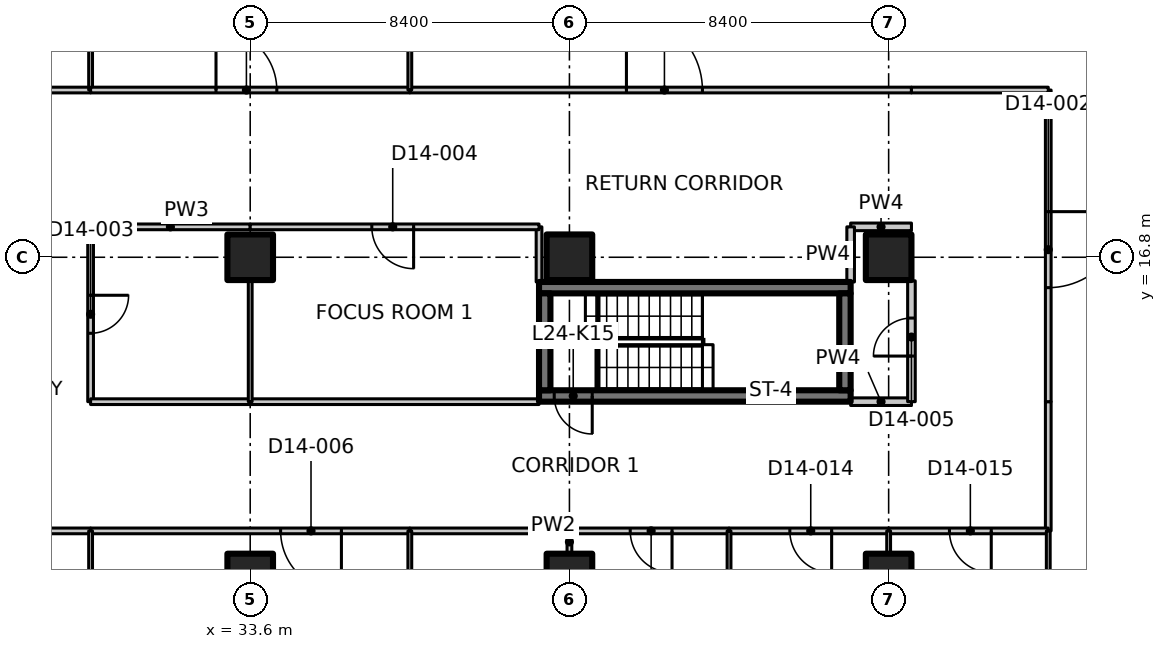
"""IFC4 building model, lengths in metres.
Left out: names, types, materials, properties, quantities, classifications, styles, units other than length and angle.
Written with IfcOpenShell. Run it as: python <this file> out.ifc"""

import sys

from ifc_helpers import new_model, si_unit, direction, frame, frame_2d, origin, origin_2d, place, context, subcontext, project, spatial, polyline, rectangle, outline, extrude, element, fill, save


model = new_model("IFC4")
c1 = context("Model", 3, precision=1e-05, world=origin(), true_north=direction((0.0, 1.0)))
c2 = subcontext(c1, "Body", "Model", "MODEL_VIEW")
j1 = project(units=[si_unit("LENGTHUNIT", "METRE"), si_unit("PLANEANGLEUNIT", "RADIAN")], contexts=[c1])
p1 = place(None, origin())
s1 = spatial("IfcSite", under=j1, at=p1, CompositionType="ELEMENT")
p2 = place(p1, origin())
s2 = spatial("IfcBuilding", under=s1, at=p2, CompositionType="ELEMENT")
p3 = place(p2, frame((0.0, 0.0, 102.5)))
s3 = spatial("IfcBuildingStorey", under=s2, at=p3, CompositionType="ELEMENT", Elevation=102.5)
for number, where, z_axis, x_axis in (
    (1, (33.6, 8.4, 0.0), (0.0, 0.0, 1.0), (1.0, 0.0, 0.0)),
    (2, (33.6, 16.8, 0.0), (0.0, 0.0, 1.0), (1.0, 0.0, 0.0)),
    (3, (42.0, 8.4, 0.0), (0.0, 0.0, 1.0), (1.0, 0.0, 0.0)),
    (4, (42.0, 16.8, 0.0), (0.0, 0.0, 1.0), (1.0, 0.0, 0.0)),
    (5, (50.4, 8.4, 0.0), (0.0, 0.0, 1.0), (1.0, 0.0, 0.0)),
    (6, (50.4, 16.8, 0.0), (0.0, 0.0, 1.0), (1.0, 0.0, 0.0)),
):
    element("IfcColumn", number, at=place(p3, frame(where, z_axis=z_axis, x_axis=x_axis)), inside=s3, PredefinedType="COLUMN", context=c2, shape_type="SweptSolid", body=[
        extrude(rectangle(XDim=1.2, YDim=1.2, at=origin_2d()), origin(), (0.0, 0.0, 1.0), 3.35),
    ])
p4 = place(p3, frame((49.4, 13.15, 0.0), z_axis=(0.0, 0.0, 1.0), x_axis=(-1.0, 0.0, 0.0)))
e7 = element("IfcWall", 7, at=p4, inside=s3, PredefinedType="SHEAR", context=c2, shape_type="SweptSolid", body=[
    extrude(rectangle(XDim=8.2, YDim=0.3, at=frame_2d((4.1, 0.0))), origin(), (0.0, 0.0, 1.0), 3.35),
])
p5 = place(p4, frame((6.8, 0.0, 0.0)))
e8 = element("IfcOpeningElement", 8, at=p5, cuts=e7, PredefinedType="OPENING", context=c2, shape_type="SweptSolid", body=[
    extrude(rectangle(XDim=1.0, YDim=2.1, at=frame_2d((0.5, 1.05))), frame((0.0, 0.16, 0.0), z_axis=(0.0, -1.0, 0.0), x_axis=(1.0, 0.0, 0.0)), (0.0, 0.0, 1.0), 0.32),
])
p6 = place(p3, frame((41.2, 16.0, 0.0), z_axis=(0.0, 0.0, 1.0), x_axis=(1.0, 0.0, 0.0)))
e9 = element("IfcWall", 9, at=p6, inside=s3, PredefinedType="SHEAR", context=c2, shape_type="SweptSolid", body=[
    extrude(rectangle(XDim=8.2, YDim=0.3, at=frame_2d((4.1, 0.0))), origin(), (0.0, 0.0, 1.0), 3.35),
])
for number, where, z_axis, x_axis in (
    (10, (41.35, 13.3, 0.0), (0.0, 0.0, 1.0), (0.0, 1.0, 0.0)),
    (11, (49.25, 13.3, 0.0), (0.0, 0.0, 1.0), (0.0, 1.0, 0.0)),
):
    element("IfcWall", number, at=place(p3, frame(where, z_axis=z_axis, x_axis=x_axis)), inside=s3, PredefinedType="SHEAR", context=c2, shape_type="SweptSolid", body=[
        extrude(rectangle(XDim=2.55, YDim=0.3, at=frame_2d((1.275, 0.0))), origin(), (0.0, 0.0, 1.0), 3.35),
    ])
p7 = place(p3, frame((25.2, 21.2, 0.0), z_axis=(0.0, 0.0, 1.0), x_axis=(1.0, 0.0, 0.0)))
e12 = element("IfcWall", 12, at=p7, inside=s3, PredefinedType="PARTITIONING", context=c2, shape_type="SweptSolid", body=[
    extrude(rectangle(XDim=4.2, YDim=0.15, at=frame_2d((2.1, 0.0))), origin(), (0.0, 0.0, 1.0), 3.33),
])
p8 = place(p3, frame((29.4, 17.6, 0.0), z_axis=(0.0, 0.0, 1.0), x_axis=(0.0, -1.0, 0.0)))
e13 = element("IfcWall", 13, at=p8, inside=s3, PredefinedType="PARTITIONING", context=c2, shape_type="SweptSolid", body=[
    extrude(rectangle(XDim=4.6, YDim=0.15, at=frame_2d((2.3, 0.0))), origin(), (0.0, 0.0, 1.0), 3.33),
])
p9 = place(p8, frame((1.8, 0.0, 0.0)))
e14 = element("IfcOpeningElement", 14, at=p9, cuts=e13, PredefinedType="OPENING", context=c2, shape_type="SweptSolid", body=[
    extrude(rectangle(XDim=1.0, YDim=2.1, at=frame_2d((0.5, 1.05))), frame((0.0, 0.085, 0.0), z_axis=(0.0, -1.0, 0.0), x_axis=(1.0, 0.0, 0.0)), (0.0, 0.0, 1.0), 0.17),
])
p10 = place(p3, frame((29.4, 9.6, 0.0), z_axis=(0.0, 0.0, 1.0), x_axis=(-1.0, 0.0, 0.0)))
e15 = element("IfcWall", 15, at=p10, inside=s3, PredefinedType="PARTITIONING", context=c2, shape_type="SweptSolid", body=[
    extrude(rectangle(XDim=4.2, YDim=0.15, at=frame_2d((2.1, 0.0))), origin(), (0.0, 0.0, 1.0), 3.33),
])
p11 = place(p3, frame((29.4, 27.429, 0.0), z_axis=(0.0, 0.0, 1.0), x_axis=(0.0, -1.0, 0.0)))
e16 = element("IfcWall", 16, at=p11, inside=s3, PredefinedType="PARTITIONING", context=c2, shape_type="SweptSolid", body=[
    extrude(outline(polyline([(0.0, 0.0), (6.229, 0.0), (6.229, 3.33), (2.679, 3.33), (2.677, 2.98), (1.781, 2.98), (1.779, 3.33), (0.154, 3.33), (0.0, 3.33), (0.0, 0.0)])), frame((0.0, 0.05, 0.0), z_axis=(0.0, -1.0, 0.0), x_axis=(1.0, 0.0, 0.0)), (0.0, 0.0, 1.0), 0.1),
])
p12 = place(p3, frame((54.6, 13.0, 0.0), z_axis=(0.0, 0.0, 1.0), x_axis=(0.0, -1.0, 0.0)))
e17 = element("IfcWall", 17, at=p12, inside=s3, PredefinedType="PARTITIONING", context=c2, shape_type="SweptSolid", body=[
    extrude(rectangle(XDim=3.4, YDim=0.15, at=frame_2d((1.7, 0.0))), origin(), (0.0, 0.0, 1.0), 3.33),
])
p13 = place(p3, frame((29.4, 13.0, 0.0), z_axis=(0.0, 0.0, 1.0), x_axis=(1.0, 0.0, 0.0)))
e18 = element("IfcWall", 18, at=p13, inside=s3, PredefinedType="PARTITIONING", context=c2, shape_type="SweptSolid", body=[
    extrude(rectangle(XDim=4.2, YDim=0.15, at=frame_2d((2.1, 0.0))), origin(), (0.0, 0.0, 1.0), 3.33),
])
p14 = place(p3, frame((33.6, 13.0, 0.0), z_axis=(0.0, 0.0, 1.0), x_axis=(1.0, 0.0, 0.0)))
e19 = element("IfcWall", 19, at=p14, inside=s3, PredefinedType="PARTITIONING", context=c2, shape_type="SweptSolid", body=[
    extrude(rectangle(XDim=7.6, YDim=0.15, at=frame_2d((3.8, 0.0))), origin(), (0.0, 0.0, 1.0), 3.33),
])
p15 = place(p3, frame((49.4, 13.0, 0.0), z_axis=(0.0, 0.0, 1.0), x_axis=(1.0, 0.0, 0.0)))
e20 = element("IfcWall", 20, at=p15, inside=s3, PredefinedType="PARTITIONING", context=c2, shape_type="SweptSolid", body=[
    extrude(rectangle(XDim=1.6, YDim=0.2, at=frame_2d((0.8, 0.0))), origin(), (0.0, 0.0, 1.0), 3.33),
])
p16 = place(p3, frame((37.8, 9.6, 0.0), z_axis=(0.0, 0.0, 1.0), x_axis=(-1.0, 0.0, 0.0)))
e21 = element("IfcWall", 21, at=p16, inside=s3, PredefinedType="PARTITIONING", context=c2, shape_type="SweptSolid", body=[
    extrude(rectangle(XDim=8.4, YDim=0.15, at=frame_2d((4.2, 0.0))), origin(), (0.0, 0.0, 1.0), 3.33),
])
p17 = place(p16, frame((1.8, 0.0, 0.0)))
e22 = element("IfcOpeningElement", 22, at=p17, cuts=e21, PredefinedType="OPENING", context=c2, shape_type="SweptSolid", body=[
    extrude(rectangle(XDim=1.6, YDim=2.1, at=frame_2d((0.8, 1.05))), frame((0.0, 0.085, 0.0), z_axis=(0.0, -1.0, 0.0), x_axis=(1.0, 0.0, 0.0)), (0.0, 0.0, 1.0), 0.17),
])
p18 = place(p3, frame((42.0, 9.6, 0.0), z_axis=(0.0, 0.0, 1.0), x_axis=(-1.0, 0.0, 0.0)))
e23 = element("IfcWall", 23, at=p18, inside=s3, PredefinedType="PARTITIONING", context=c2, shape_type="SweptSolid", body=[
    extrude(rectangle(XDim=4.2, YDim=0.15, at=frame_2d((2.1, 0.0))), origin(), (0.0, 0.0, 1.0), 3.33),
])
p19 = place(p3, frame((46.2, 9.6, 0.0), z_axis=(0.0, 0.0, 1.0), x_axis=(-1.0, 0.0, 0.0)))
e24 = element("IfcWall", 24, at=p19, inside=s3, PredefinedType="PARTITIONING", context=c2, shape_type="SweptSolid", body=[
    extrude(rectangle(XDim=4.2, YDim=0.15, at=frame_2d((2.1, 0.0))), origin(), (0.0, 0.0, 1.0), 3.33),
])
p20 = place(p19, frame((1.5, 0.0, 0.0)))
e25 = element("IfcOpeningElement", 25, at=p20, cuts=e24, PredefinedType="OPENING", context=c2, shape_type="SweptSolid", body=[
    extrude(rectangle(XDim=1.1, YDim=2.1, at=frame_2d((0.55, 1.05))), frame((0.0, 0.085, 0.0), z_axis=(0.0, -1.0, 0.0), x_axis=(1.0, 0.0, 0.0)), (0.0, 0.0, 1.0), 0.17),
])
p21 = place(p3, frame((50.4, 9.6, 0.0), z_axis=(0.0, 0.0, 1.0), x_axis=(-1.0, 0.0, 0.0)))
e26 = element("IfcWall", 26, at=p21, inside=s3, PredefinedType="PARTITIONING", context=c2, shape_type="SweptSolid", body=[
    extrude(rectangle(XDim=4.2, YDim=0.15, at=frame_2d((2.1, 0.0))), origin(), (0.0, 0.0, 1.0), 3.33),
])
p22 = place(p21, frame((1.5, 0.0, 0.0)))
e27 = element("IfcOpeningElement", 27, at=p22, cuts=e26, PredefinedType="OPENING", context=c2, shape_type="SweptSolid", body=[
    extrude(rectangle(XDim=1.1, YDim=2.1, at=frame_2d((0.55, 1.05))), frame((0.0, 0.085, 0.0), z_axis=(0.0, -1.0, 0.0), x_axis=(1.0, 0.0, 0.0)), (0.0, 0.0, 1.0), 0.17),
])
p23 = place(p3, frame((54.6, 9.6, 0.0), z_axis=(0.0, 0.0, 1.0), x_axis=(-1.0, 0.0, 0.0)))
e28 = element("IfcWall", 28, at=p23, inside=s3, PredefinedType="PARTITIONING", context=c2, shape_type="SweptSolid", body=[
    extrude(rectangle(XDim=4.2, YDim=0.15, at=frame_2d((2.1, 0.0))), origin(), (0.0, 0.0, 1.0), 3.33),
])
p24 = place(p23, frame((1.5, 0.0, 0.0)))
e29 = element("IfcOpeningElement", 29, at=p24, cuts=e28, PredefinedType="OPENING", context=c2, shape_type="SweptSolid", body=[
    extrude(rectangle(XDim=1.1, YDim=2.1, at=frame_2d((0.55, 1.05))), frame((0.0, 0.085, 0.0), z_axis=(0.0, -1.0, 0.0), x_axis=(1.0, 0.0, 0.0)), (0.0, 0.0, 1.0), 0.17),
])
p25 = place(p3, frame((54.6, 21.2, 0.0), z_axis=(0.0, 0.0, 1.0), x_axis=(0.0, -1.0, 0.0)))
e30 = element("IfcWall", 30, at=p25, inside=s3, PredefinedType="PARTITIONING", context=c2, shape_type="SweptSolid", body=[
    extrude(rectangle(XDim=8.2, YDim=0.15, at=frame_2d((4.1, 0.0))), origin(), (0.0, 0.0, 1.0), 3.33),
])
p26 = place(p25, frame((3.2, 0.0, 0.0)))
e31 = element("IfcOpeningElement", 31, at=p26, cuts=e30, PredefinedType="OPENING", context=c2, shape_type="SweptSolid", body=[
    extrude(rectangle(XDim=2.0, YDim=2.4, at=frame_2d((1.0, 1.2))), frame((0.0, 0.085, 0.0), z_axis=(0.0, -1.0, 0.0), x_axis=(1.0, 0.0, 0.0)), (0.0, 0.0, 1.0), 0.17),
])
p27 = place(p3, frame((54.6, -1.365, 0.0), z_axis=(0.0, 0.0, 1.0), x_axis=(0.0, 1.0, 0.0)))
e32 = element("IfcWall", 32, at=p27, inside=s3, PredefinedType="PARTITIONING", context=c2, shape_type="SweptSolid", body=[
    extrude(outline(polyline([(0.0, 0.0), (10.965, 0.0), (10.965, 3.33), (1.815, 3.33), (1.813, 2.98), (0.917, 2.98), (0.915, 3.33), (0.265, 3.33), (0.0, 3.33), (0.0, 0.0)])), frame((0.0, 0.05, 0.0), z_axis=(0.0, -1.0, 0.0), x_axis=(1.0, 0.0, 0.0)), (0.0, 0.0, 1.0), 0.1),
])
p28 = place(p3, frame((33.6, 17.6, 0.0), z_axis=(0.0, 0.0, 1.0), x_axis=(-1.0, 0.0, 0.0)))
e33 = element("IfcWall", 33, at=p28, inside=s3, PredefinedType="PARTITIONING", context=c2, shape_type="SweptSolid", body=[
    extrude(rectangle(XDim=4.2, YDim=0.15, at=frame_2d((2.1, 0.0))), origin(), (0.0, 0.0, 1.0), 3.33),
])
p29 = place(p3, frame((41.2, 16.15, 0.0), z_axis=(0.0, 0.0, 1.0), x_axis=(0.0, 1.0, 0.0)))
e34 = element("IfcWall", 34, at=p29, inside=s3, PredefinedType="PARTITIONING", context=c2, shape_type="SweptSolid", body=[
    extrude(rectangle(XDim=1.45, YDim=0.15, at=frame_2d((0.725, 0.0))), origin(), (0.0, 0.0, 1.0), 3.33),
])
p30 = place(p3, frame((41.2, 17.6, 0.0), z_axis=(0.0, 0.0, 1.0), x_axis=(-1.0, 0.0, 0.0)))
e35 = element("IfcWall", 35, at=p30, inside=s3, PredefinedType="PARTITIONING", context=c2, shape_type="SweptSolid", body=[
    extrude(rectangle(XDim=7.6, YDim=0.15, at=frame_2d((3.8, 0.0))), origin(), (0.0, 0.0, 1.0), 3.33),
])
p31 = place(p30, frame((3.3, 0.0, 0.0)))
e36 = element("IfcOpeningElement", 36, at=p31, cuts=e35, PredefinedType="OPENING", context=c2, shape_type="SweptSolid", body=[
    extrude(rectangle(XDim=1.1, YDim=2.1, at=frame_2d((0.55, 1.05))), frame((0.0, 0.085, 0.0), z_axis=(0.0, -1.0, 0.0), x_axis=(1.0, 0.0, 0.0)), (0.0, 0.0, 1.0), 0.17),
])
p32 = place(p3, frame((51.0, 17.6, 0.0), z_axis=(0.0, 0.0, 1.0), x_axis=(-1.0, 0.0, 0.0)))
e37 = element("IfcWall", 37, at=p32, inside=s3, PredefinedType="PARTITIONING", context=c2, shape_type="SweptSolid", body=[
    extrude(rectangle(XDim=1.6, YDim=0.2, at=frame_2d((0.8, 0.0))), origin(), (0.0, 0.0, 1.0), 3.33),
])
p33 = place(p3, frame((49.4, 17.6, 0.0), z_axis=(0.0, 0.0, 1.0), x_axis=(0.0, -1.0, 0.0)))
e38 = element("IfcWall", 38, at=p33, inside=s3, PredefinedType="PARTITIONING", context=c2, shape_type="SweptSolid", body=[
    extrude(rectangle(XDim=1.45, YDim=0.2, at=frame_2d((0.725, 0.0))), origin(), (0.0, 0.0, 1.0), 3.33),
])
p34 = place(p3, frame((29.4, 21.2, 0.0), z_axis=(0.0, 0.0, 1.0), x_axis=(1.0, 0.0, 0.0)))
e39 = element("IfcWall", 39, at=p34, inside=s3, PredefinedType="PARTITIONING", context=c2, shape_type="SweptSolid", body=[
    extrude(rectangle(XDim=8.4, YDim=0.15, at=frame_2d((4.2, 0.0))), origin(), (0.0, 0.0, 1.0), 3.33),
])
p35 = place(p34, frame((3.3, 0.0, 0.0)))
e40 = element("IfcOpeningElement", 40, at=p35, cuts=e39, PredefinedType="OPENING", context=c2, shape_type="SweptSolid", body=[
    extrude(rectangle(XDim=1.6, YDim=2.1, at=frame_2d((0.8, 1.05))), frame((0.0, 0.085, 0.0), z_axis=(0.0, -1.0, 0.0), x_axis=(1.0, 0.0, 0.0)), (0.0, 0.0, 1.0), 0.17),
])
p36 = place(p3, frame((37.8, 21.2, 0.0), z_axis=(0.0, 0.0, 1.0), x_axis=(1.0, 0.0, 0.0)))
e41 = element("IfcWall", 41, at=p36, inside=s3, PredefinedType="PARTITIONING", context=c2, shape_type="SweptSolid", body=[
    extrude(rectangle(XDim=13.2, YDim=0.15, at=frame_2d((6.6, 0.0))), origin(), (0.0, 0.0, 1.0), 3.33),
])
p37 = place(p36, frame((5.7, 0.0, 0.0)))
e42 = element("IfcOpeningElement", 42, at=p37, cuts=e41, PredefinedType="OPENING", context=c2, shape_type="SweptSolid", body=[
    extrude(rectangle(XDim=2.0, YDim=2.4, at=frame_2d((1.0, 1.2))), frame((0.0, 0.085, 0.0), z_axis=(0.0, -1.0, 0.0), x_axis=(1.0, 0.0, 0.0)), (0.0, 0.0, 1.0), 0.17),
])
p38 = place(p3, frame((51.0, 13.0, 0.0), z_axis=(0.0, 0.0, 1.0), x_axis=(0.0, 1.0, 0.0)))
e43 = element("IfcWall", 43, at=p38, inside=s3, PredefinedType="PARTITIONING", context=c2, shape_type="SweptSolid", body=[
    extrude(rectangle(XDim=3.18, YDim=0.2, at=frame_2d((1.59, 0.0))), origin(), (0.0, 0.0, 1.0), 3.33),
])
p39 = place(p38, frame((1.2, 0.0, 0.0)))
e44 = element("IfcOpeningElement", 44, at=p39, cuts=e43, PredefinedType="OPENING", context=c2, shape_type="SweptSolid", body=[
    extrude(rectangle(XDim=1.0, YDim=2.1, at=frame_2d((0.5, 1.05))), frame((0.0, 0.11, 0.0), z_axis=(0.0, -1.0, 0.0), x_axis=(1.0, 0.0, 0.0)), (0.0, 0.0, 1.0), 0.22),
])
p40 = place(p3, frame((51.0, 21.2, 0.0), z_axis=(0.0, 0.0, 1.0), x_axis=(1.0, 0.0, 0.0)))
e45 = element("IfcWall", 45, at=p40, inside=s3, PredefinedType="PARTITIONING", context=c2, shape_type="SweptSolid", body=[
    extrude(rectangle(XDim=3.6, YDim=0.15, at=frame_2d((1.8, 0.0))), origin(), (0.0, 0.0, 1.0), 3.33),
])
p41 = place(p3, frame((33.6, 16.18, 0.0), z_axis=(0.0, 0.0, 1.0), x_axis=(0.0, -1.0, 0.0)))
e46 = element("IfcWall", 46, at=p41, inside=s3, PredefinedType="PARTITIONING", context=c2, shape_type="SweptSolid", body=[
    extrude(rectangle(XDim=3.18, YDim=0.1, at=frame_2d((1.59, 0.0))), origin(), (0.0, 0.0, 1.0), 3.33),
])
p42 = place(p3, frame((37.8, 9.6, 0.0), z_axis=(0.0, 0.0, 1.0), x_axis=(0.0, -1.0, 0.0)))
e47 = element("IfcWall", 47, at=p42, inside=s3, PredefinedType="PARTITIONING", context=c2, shape_type="SweptSolid", body=[
    extrude(rectangle(XDim=4.2, YDim=0.1, at=frame_2d((2.1, 0.0))), origin(), (0.0, 0.0, 1.0), 3.33),
])
p43 = place(p3, frame((29.4, 6.0, 0.0), z_axis=(0.0, 0.0, 1.0), x_axis=(0.0, 1.0, 0.0)))
e48 = element("IfcWall", 48, at=p43, inside=s3, PredefinedType="PARTITIONING", context=c2, shape_type="SweptSolid", body=[
    extrude(rectangle(XDim=3.6, YDim=0.1, at=frame_2d((1.8, 0.0))), origin(), (0.0, 0.0, 1.0), 3.33),
])
p44 = place(p3, frame((42.0, 9.6, 0.0), z_axis=(0.0, 0.0, 1.0), x_axis=(0.0, -1.0, 0.0)))
e49 = element("IfcWall", 49, at=p44, inside=s3, PredefinedType="PARTITIONING", context=c2, shape_type="SweptSolid", body=[
    extrude(rectangle(XDim=0.58, YDim=0.125, at=frame_2d((0.29, 0.0))), origin(), (0.0, 0.0, 1.0), 3.33),
])
p45 = place(p3, frame((46.2, 9.6, 0.0), z_axis=(0.0, 0.0, 1.0), x_axis=(0.0, -1.0, 0.0)))
e50 = element("IfcWall", 50, at=p45, inside=s3, PredefinedType="PARTITIONING", context=c2, shape_type="SweptSolid", body=[
    extrude(outline(polyline([(0.0, 0.0), (10.965, 0.0), (10.965, 3.33), (10.7, 3.33), (10.05, 3.33), (10.048, 2.98), (9.152, 2.98), (9.15, 3.33), (0.0, 3.33), (0.0, 0.0)])), frame((0.0, 0.05, 0.0), z_axis=(0.0, -1.0, 0.0), x_axis=(1.0, 0.0, 0.0)), (0.0, 0.0, 1.0), 0.1),
])
p46 = place(p3, frame((50.4, 9.6, 0.0), z_axis=(0.0, 0.0, 1.0), x_axis=(0.0, -1.0, 0.0)))
e51 = element("IfcWall", 51, at=p46, inside=s3, PredefinedType="PARTITIONING", context=c2, shape_type="SweptSolid", body=[
    extrude(rectangle(XDim=0.58, YDim=0.1, at=frame_2d((0.29, 0.0))), origin(), (0.0, 0.0, 1.0), 3.33),
])
p47 = place(p3, frame((37.8, 30.243, 0.0), z_axis=(0.0, 0.0, 1.0), x_axis=(0.0, -1.0, 0.0)))
e52 = element("IfcWall", 52, at=p47, inside=s3, PredefinedType="PARTITIONING", context=c2, shape_type="SweptSolid", body=[
    extrude(outline(polyline([(0.0, 0.0), (9.043, 0.0), (9.043, 3.33), (5.493, 3.33), (5.491, 2.98), (4.595, 2.98), (4.593, 3.33), (0.0, 3.33), (0.0, 0.0)])), frame((0.0, 0.05, 0.0), z_axis=(0.0, -1.0, 0.0), x_axis=(1.0, 0.0, 0.0)), (0.0, 0.0, 1.0), 0.1),
])
p48 = place(p5, origin())
e53 = element("IfcDoor", 53, at=p48, inside=s3, OperationType="SINGLE_SWING_LEFT", PredefinedType="DOOR", context=c2, shape_type="SweptSolid", body=[
    extrude(rectangle(XDim=1.0, YDim=2.1, at=frame_2d((0.5, 1.05))), frame((0.0, 0.025, 0.0), z_axis=(0.0, -1.0, 0.0), x_axis=(1.0, 0.0, 0.0)), (0.0, 0.0, 1.0), 0.05),
])
fill(e8, e53)
p49 = place(p26, origin())
e54 = element("IfcDoor", 54, at=p49, inside=s3, OperationType="DOUBLE_DOOR_SINGLE_SWING", PredefinedType="DOOR", context=c2, shape_type="SweptSolid", body=[
    extrude(rectangle(XDim=2.0, YDim=2.4, at=frame_2d((1.0, 1.2))), frame((0.0, 0.025, 0.0), z_axis=(0.0, -1.0, 0.0), x_axis=(1.0, 0.0, 0.0)), (0.0, 0.0, 1.0), 0.05),
])
fill(e31, e54)
p50 = place(p9, origin())
e55 = element("IfcDoor", 55, at=p50, inside=s3, OperationType="SINGLE_SWING_LEFT", PredefinedType="DOOR", context=c2, shape_type="SweptSolid", body=[
    extrude(rectangle(XDim=1.0, YDim=2.1, at=frame_2d((0.5, 1.05))), frame((0.0, 0.025, 0.0), z_axis=(0.0, -1.0, 0.0), x_axis=(1.0, 0.0, 0.0)), (0.0, 0.0, 1.0), 0.05),
])
fill(e14, e55)
p51 = place(p31, origin())
e56 = element("IfcDoor", 56, at=p51, inside=s3, OperationType="SINGLE_SWING_LEFT", PredefinedType="DOOR", context=c2, shape_type="SweptSolid", body=[
    extrude(rectangle(XDim=1.1, YDim=2.1, at=frame_2d((0.55, 1.05))), frame((0.0, 0.025, 0.0), z_axis=(0.0, -1.0, 0.0), x_axis=(1.0, 0.0, 0.0)), (0.0, 0.0, 1.0), 0.05),
])
fill(e36, e56)
p52 = place(p39, origin())
e57 = element("IfcDoor", 57, at=p52, inside=s3, OperationType="SINGLE_SWING_LEFT", PredefinedType="DOOR", context=c2, shape_type="SweptSolid", body=[
    extrude(rectangle(XDim=1.0, YDim=2.1, at=frame_2d((0.5, 1.05))), frame((0.0, 0.025, 0.0), z_axis=(0.0, -1.0, 0.0), x_axis=(1.0, 0.0, 0.0)), (0.0, 0.0, 1.0), 0.05),
])
fill(e44, e57)
p53 = place(p17, origin())
e58 = element("IfcDoor", 58, at=p53, inside=s3, OperationType="DOUBLE_DOOR_SINGLE_SWING", PredefinedType="DOOR", context=c2, shape_type="SweptSolid", body=[
    extrude(rectangle(XDim=1.6, YDim=2.1, at=frame_2d((0.8, 1.05))), frame((0.0, 0.025, 0.0), z_axis=(0.0, -1.0, 0.0), x_axis=(1.0, 0.0, 0.0)), (0.0, 0.0, 1.0), 0.05),
])
fill(e22, e58)
p54 = place(p20, origin())
e59 = element("IfcDoor", 59, at=p54, inside=s3, OperationType="SINGLE_SWING_LEFT", PredefinedType="DOOR", context=c2, shape_type="SweptSolid", body=[
    extrude(rectangle(XDim=1.1, YDim=2.1, at=frame_2d((0.55, 1.05))), frame((0.0, 0.025, 0.0), z_axis=(0.0, -1.0, 0.0), x_axis=(1.0, 0.0, 0.0)), (0.0, 0.0, 1.0), 0.05),
])
fill(e25, e59)
p55 = place(p22, origin())
e60 = element("IfcDoor", 60, at=p55, inside=s3, OperationType="SINGLE_SWING_LEFT", PredefinedType="DOOR", context=c2, shape_type="SweptSolid", body=[
    extrude(rectangle(XDim=1.1, YDim=2.1, at=frame_2d((0.55, 1.05))), frame((0.0, 0.025, 0.0), z_axis=(0.0, -1.0, 0.0), x_axis=(1.0, 0.0, 0.0)), (0.0, 0.0, 1.0), 0.05),
])
fill(e27, e60)
p56 = place(p24, origin())
e61 = element("IfcDoor", 61, at=p56, inside=s3, OperationType="SINGLE_SWING_LEFT", PredefinedType="DOOR", context=c2, shape_type="SweptSolid", body=[
    extrude(rectangle(XDim=1.1, YDim=2.1, at=frame_2d((0.55, 1.05))), frame((0.0, 0.025, 0.0), z_axis=(0.0, -1.0, 0.0), x_axis=(1.0, 0.0, 0.0)), (0.0, 0.0, 1.0), 0.05),
])
fill(e29, e61)
p57 = place(p35, origin())
e62 = element("IfcDoor", 62, at=p57, inside=s3, OperationType="DOUBLE_DOOR_SINGLE_SWING", PredefinedType="DOOR", context=c2, shape_type="SweptSolid", body=[
    extrude(rectangle(XDim=1.6, YDim=2.1, at=frame_2d((0.8, 1.05))), frame((0.0, 0.025, 0.0), z_axis=(0.0, -1.0, 0.0), x_axis=(1.0, 0.0, 0.0)), (0.0, 0.0, 1.0), 0.05),
])
fill(e40, e62)
p58 = place(p37, origin())
e63 = element("IfcDoor", 63, at=p58, inside=s3, OperationType="DOUBLE_DOOR_SINGLE_SWING", PredefinedType="DOOR", context=c2, shape_type="SweptSolid", body=[
    extrude(rectangle(XDim=2.0, YDim=2.4, at=frame_2d((1.0, 1.2))), frame((0.0, 0.025, 0.0), z_axis=(0.0, -1.0, 0.0), x_axis=(1.0, 0.0, 0.0)), (0.0, 0.0, 1.0), 0.05),
])
fill(e42, e63)
save(model, sys.argv[1])
